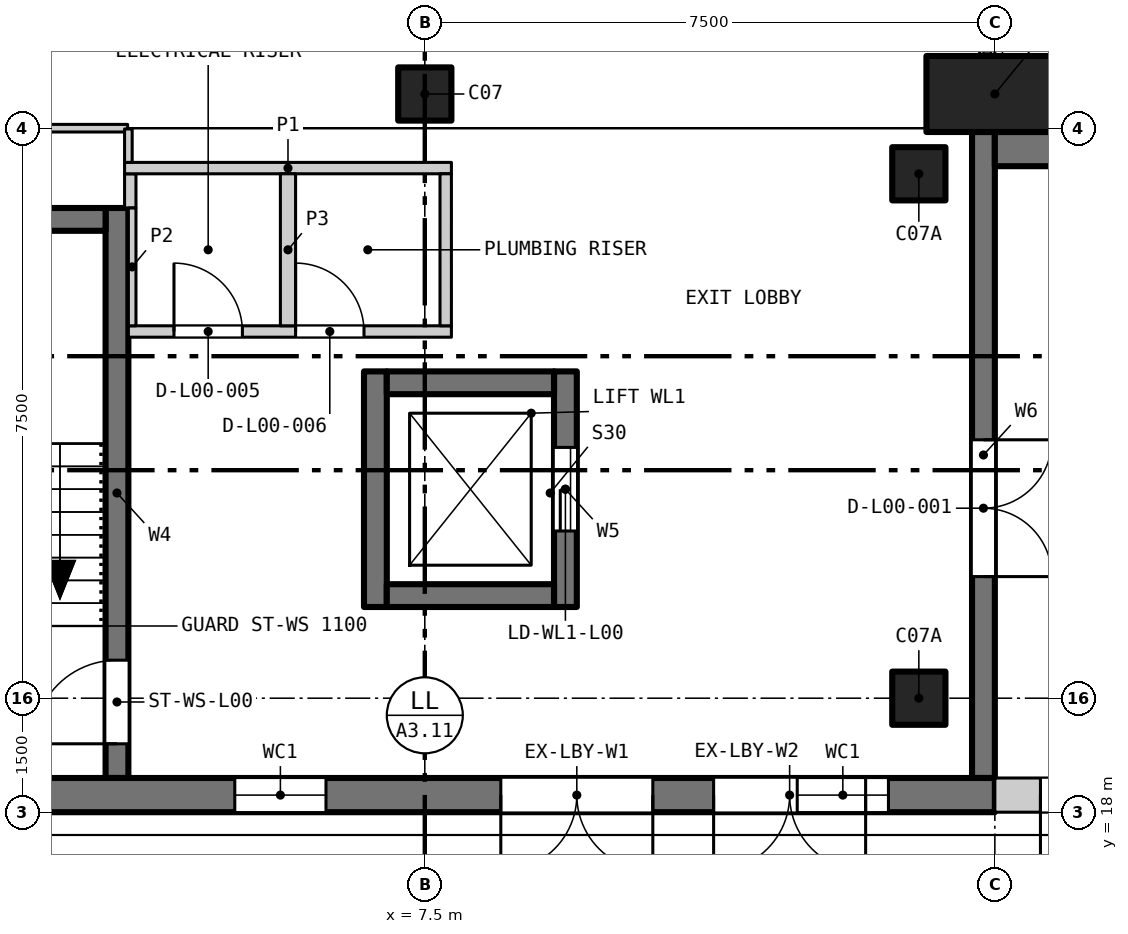
"""IFC4 building model, lengths in metres.
Left out: names, types, materials, properties, quantities, classifications, styles, units other than length and angle.
Written with IfcOpenShell. Run it as: python <this file> out.ifc"""

import sys

from ifc_helpers import new_model, si_unit, direction, frame, frame_2d, origin, origin_2d, place, context, subcontext, project, spatial, rectangle, extrude, element, fill, save


model = new_model("IFC4")
c1 = context("Model", 3, precision=1e-05, world=origin(), true_north=direction((0.0, 1.0)))
c2 = subcontext(c1, "Body", "Model", "MODEL_VIEW")
j1 = project(units=[si_unit("LENGTHUNIT", "METRE"), si_unit("PLANEANGLEUNIT", "RADIAN")], contexts=[c1])
p1 = place(None, origin())
s1 = spatial("IfcSite", under=j1, at=p1, CompositionType="ELEMENT")
p2 = place(p1, origin())
s2 = spatial("IfcBuilding", under=s1, at=p2, CompositionType="ELEMENT")
p3 = place(p2, origin())
s3 = spatial("IfcBuildingStorey", under=s2, at=p3, CompositionType="ELEMENT", Elevation=0.0)
for number, where, z_axis, x_axis in (
    (1, (7.5, 27.45, 0.0), (0.0, 0.0, 1.0), (1.0, 0.0, 0.0)),
    (2, (14.0, 19.5, 0.0), (0.0, 0.0, 1.0), (1.0, 0.0, 0.0)),
    (3, (14.0, 26.4, 0.0), (0.0, 0.0, 1.0), (1.0, 0.0, 0.0)),
):
    element("IfcColumn", number, at=place(p3, frame(where, z_axis=z_axis, x_axis=x_axis)), inside=s3, PredefinedType="COLUMN", context=c2, shape_type="SweptSolid", body=[
        extrude(rectangle(XDim=0.7, YDim=0.7, at=origin_2d()), origin(), (0.0, 0.0, 1.0), 6.0),
    ])
p4 = place(p3, frame((14.85, 18.45, 0.0), z_axis=(0.0, 0.0, 1.0), x_axis=(0.0, 1.0, 0.0)))
e4 = element("IfcWall", 4, at=p4, inside=s3, PredefinedType="SOLIDWALL", context=c2, shape_type="SweptSolid", body=[
    extrude(rectangle(XDim=8.5, YDim=0.3, at=frame_2d((4.25, 0.0))), origin(), (0.0, 0.0, 1.0), 6.0),
])
p5 = place(p4, frame((2.65, 0.0, 0.0)))
e5 = element("IfcOpeningElement", 5, at=p5, cuts=e4, PredefinedType="OPENING", context=c2, shape_type="SweptSolid", body=[
    extrude(rectangle(XDim=1.8, YDim=2.1, at=frame_2d((0.9, 1.05))), frame((0.0, 0.16, 0.0), z_axis=(0.0, -1.0, 0.0), x_axis=(1.0, 0.0, 0.0)), (0.0, 0.0, 1.0), 0.32),
])
p6 = place(p3, frame((3.45, 18.45, 0.0), z_axis=(0.0, 0.0, 1.0), x_axis=(0.0, 1.0, 0.0)))
e6 = element("IfcWall", 6, at=p6, inside=s3, PredefinedType="SHEAR", context=c2, shape_type="SweptSolid", body=[
    extrude(rectangle(XDim=7.5, YDim=0.3, at=frame_2d((3.75, 0.0))), origin(), (0.0, 0.0, 1.0), 6.0),
])
p7 = place(p6, frame((0.45, 0.0, 0.0)))
e7 = element("IfcOpeningElement", 7, at=p7, cuts=e6, PredefinedType="OPENING", context=c2, shape_type="SweptSolid", body=[
    extrude(rectangle(XDim=1.1, YDim=2.1, at=frame_2d((0.55, 1.05))), frame((0.0, 0.16, 0.0), z_axis=(0.0, -1.0, 0.0), x_axis=(1.0, 0.0, 0.0)), (0.0, 0.0, 1.0), 0.32),
])
p8 = place(p3, frame((0.3, 25.8, 0.0), z_axis=(0.0, 0.0, 1.0), x_axis=(1.0, 0.0, 0.0)))
e8 = element("IfcWall", 8, at=p8, inside=s3, PredefinedType="SHEAR", context=c2, shape_type="SweptSolid", body=[
    extrude(rectangle(XDim=3.0, YDim=0.3, at=frame_2d((1.5, 0.0))), origin(), (0.0, 0.0, 1.0), 6.0),
])
p9 = place(p3, frame((6.85, 20.7, 0.0), z_axis=(0.0, 0.0, 1.0), x_axis=(0.0, 1.0, 0.0)))
e9 = element("IfcWall", 9, at=p9, inside=s3, PredefinedType="SHEAR", context=c2, shape_type="SweptSolid", body=[
    extrude(rectangle(XDim=3.1, YDim=0.3, at=frame_2d((1.55, 0.0))), origin(), (0.0, 0.0, 1.0), 6.0),
])
p10 = place(p3, frame((9.35, 20.7, 0.0), z_axis=(0.0, 0.0, 1.0), x_axis=(0.0, 1.0, 0.0)))
e10 = element("IfcWall", 10, at=p10, inside=s3, PredefinedType="SHEAR", context=c2, shape_type="SweptSolid", body=[
    extrude(rectangle(XDim=3.1, YDim=0.3, at=frame_2d((1.55, 0.0))), origin(), (0.0, 0.0, 1.0), 6.0),
])
p11 = place(p10, frame((1.0, 0.0, 0.0)))
e11 = element("IfcOpeningElement", 11, at=p11, cuts=e10, PredefinedType="OPENING", context=c2, shape_type="SweptSolid", body=[
    extrude(rectangle(XDim=1.1, YDim=2.1, at=frame_2d((0.55, 1.05))), frame((0.0, 0.16, 0.0), z_axis=(0.0, -1.0, 0.0), x_axis=(1.0, 0.0, 0.0)), (0.0, 0.0, 1.0), 0.32),
])
for number, where, z_axis, x_axis in (
    (12, (7.0, 20.85, 0.0), (0.0, 0.0, 1.0), (1.0, 0.0, 0.0)),
    (13, (7.0, 23.65, 0.0), (0.0, 0.0, 1.0), (1.0, 0.0, 0.0)),
):
    element("IfcWall", number, at=place(p3, frame(where, z_axis=z_axis, x_axis=x_axis)), inside=s3, PredefinedType="SHEAR", context=c2, shape_type="SweptSolid", body=[
        extrude(rectangle(XDim=2.2, YDim=0.3, at=frame_2d((1.1, 0.0))), origin(), (0.0, 0.0, 1.0), 6.0),
    ])
p12 = place(p3, frame((15.0, 27.45, 0.0), z_axis=(0.0, 0.0, 1.0), x_axis=(1.0, 0.0, 0.0)))
e14 = element("IfcColumn", 14, at=p12, inside=s3, PredefinedType="COLUMN", context=c2, shape_type="SweptSolid", body=[
    extrude(rectangle(XDim=1.8, YDim=1.0, at=origin_2d()), origin(), (0.0, 0.0, 1.0), 6.0),
])
p13 = place(p3, frame((15.0, 18.225, 0.0), z_axis=(0.0, 0.0, 1.0), x_axis=(-1.0, 0.0, 0.0)))
e15 = element("IfcWall", 15, at=p13, inside=s3, PredefinedType="SOLIDWALL", context=c2, shape_type="SweptSolid", body=[
    extrude(rectangle(XDim=14.7, YDim=0.45, at=frame_2d((7.35, 0.0))), origin(), (0.0, 0.0, 1.0), 5.75),
])
p14 = place(p13, frame((8.8, 0.0, 0.9)))
e16 = element("IfcOpeningElement", 16, at=p14, cuts=e15, PredefinedType="OPENING", context=c2, shape_type="SweptSolid", body=[
    extrude(rectangle(XDim=1.2, YDim=1.5, at=frame_2d((0.6, 0.75))), frame((0.0, 0.235, 0.0), z_axis=(0.0, -1.0, 0.0), x_axis=(1.0, 0.0, 0.0)), (0.0, 0.0, 1.0), 0.47),
])
p15 = place(p13, frame((1.4, 0.0, 0.9)))
e17 = element("IfcOpeningElement", 17, at=p15, cuts=e15, PredefinedType="OPENING", context=c2, shape_type="SweptSolid", body=[
    extrude(rectangle(XDim=1.2, YDim=1.5, at=frame_2d((0.6, 0.75))), frame((0.0, 0.235, 0.0), z_axis=(0.0, -1.0, 0.0), x_axis=(1.0, 0.0, 0.0)), (0.0, 0.0, 1.0), 0.47),
])
p16 = place(p13, frame((12.6, 0.0, 0.0)))
e18 = element("IfcOpeningElement", 18, at=p16, cuts=e15, PredefinedType="OPENING", context=c2, shape_type="SweptSolid", body=[
    extrude(rectangle(XDim=1.2, YDim=2.4, at=frame_2d((0.6, 1.2))), frame((0.0, 0.235, 0.0), z_axis=(0.0, -1.0, 0.0), x_axis=(1.0, 0.0, 0.0)), (0.0, 0.0, 1.0), 0.47),
])
p17 = place(p13, frame((4.5, 0.0, 0.0)))
e19 = element("IfcOpeningElement", 19, at=p17, cuts=e15, PredefinedType="OPENING", context=c2, shape_type="SweptSolid", body=[
    extrude(rectangle(XDim=2.0, YDim=2.4, at=frame_2d((1.0, 1.2))), frame((0.0, 0.235, 0.0), z_axis=(0.0, -1.0, 0.0), x_axis=(1.0, 0.0, 0.0)), (0.0, 0.0, 1.0), 0.47),
])
p18 = place(p13, frame((1.7, 0.0, 0.0)))
e20 = element("IfcOpeningElement", 20, at=p18, cuts=e15, PredefinedType="OPENING", context=c2, shape_type="SweptSolid", body=[
    extrude(rectangle(XDim=2.0, YDim=2.4, at=frame_2d((1.0, 1.2))), frame((0.0, 0.235, 0.0), z_axis=(0.0, -1.0, 0.0), x_axis=(1.0, 0.0, 0.0)), (0.0, 0.0, 1.0), 0.47),
])
p19 = place(p3, frame((43.0, 26.725, 0.0), z_axis=(0.0, 0.0, 1.0), x_axis=(-1.0, 0.0, 0.0)))
e21 = element("IfcWall", 21, at=p19, inside=s3, PredefinedType="SOLIDWALL", context=c2, shape_type="SweptSolid", body=[
    extrude(rectangle(XDim=28.0, YDim=0.45, at=frame_2d((14.0, 0.0))), origin(), (0.0, 0.0, 1.0), 5.7),
])
p20 = place(p19, frame((18.3, 0.0, 0.0)))
e22 = element("IfcOpeningElement", 22, at=p20, cuts=e21, PredefinedType="OPENING", context=c2, shape_type="SweptSolid", body=[
    extrude(rectangle(XDim=2.4, YDim=2.4, at=frame_2d((1.2, 1.2))), frame((0.0, 0.235, 0.0), z_axis=(0.0, -1.0, 0.0), x_axis=(1.0, 0.0, 0.0)), (0.0, 0.0, 1.0), 0.47),
])
p21 = place(p19, frame((6.3, 0.0, 0.0)))
e23 = element("IfcOpeningElement", 23, at=p21, cuts=e21, PredefinedType="OPENING", context=c2, shape_type="SweptSolid", body=[
    extrude(rectangle(XDim=2.4, YDim=2.4, at=frame_2d((1.2, 1.2))), frame((0.0, 0.235, 0.0), z_axis=(0.0, -1.0, 0.0), x_axis=(1.0, 0.0, 0.0)), (0.0, 0.0, 1.0), 0.47),
])
p22 = place(p3, frame((43.0, 18.225, 0.0), z_axis=(0.0, 0.0, 1.0), x_axis=(-1.0, 0.0, 0.0)))
e24 = element("IfcWall", 24, at=p22, inside=s3, PredefinedType="SOLIDWALL", context=c2, shape_type="SweptSolid", body=[
    extrude(rectangle(XDim=28.0, YDim=0.45, at=frame_2d((14.0, 0.0))), origin(), (0.0, 0.0, 1.0), 5.7),
])
p23 = place(p22, frame((21.5, 0.0, 0.0)))
e25 = element("IfcOpeningElement", 25, at=p23, cuts=e24, PredefinedType="OPENING", context=c2, shape_type="SweptSolid", body=[
    extrude(rectangle(XDim=3.0, YDim=4.2, at=frame_2d((1.5, 2.1))), frame((0.0, 0.235, 0.0), z_axis=(0.0, -1.0, 0.0), x_axis=(1.0, 0.0, 0.0)), (0.0, 0.0, 1.0), 0.47),
])
p24 = place(p22, frame((15.5, 0.0, 0.0)))
e26 = element("IfcOpeningElement", 26, at=p24, cuts=e24, PredefinedType="OPENING", context=c2, shape_type="SweptSolid", body=[
    extrude(rectangle(XDim=3.0, YDim=4.2, at=frame_2d((1.5, 2.1))), frame((0.0, 0.235, 0.0), z_axis=(0.0, -1.0, 0.0), x_axis=(1.0, 0.0, 0.0)), (0.0, 0.0, 1.0), 0.47),
])
p25 = place(p22, frame((9.5, 0.0, 0.0)))
e27 = element("IfcOpeningElement", 27, at=p25, cuts=e24, PredefinedType="OPENING", context=c2, shape_type="SweptSolid", body=[
    extrude(rectangle(XDim=3.0, YDim=4.2, at=frame_2d((1.5, 2.1))), frame((0.0, 0.235, 0.0), z_axis=(0.0, -1.0, 0.0), x_axis=(1.0, 0.0, 0.0)), (0.0, 0.0, 1.0), 0.47),
])
p26 = place(p22, frame((3.5, 0.0, 0.0)))
e28 = element("IfcOpeningElement", 28, at=p26, cuts=e24, PredefinedType="OPENING", context=c2, shape_type="SweptSolid", body=[
    extrude(rectangle(XDim=3.0, YDim=4.2, at=frame_2d((1.5, 2.1))), frame((0.0, 0.235, 0.0), z_axis=(0.0, -1.0, 0.0), x_axis=(1.0, 0.0, 0.0)), (0.0, 0.0, 1.0), 0.47),
])
p27 = place(p22, frame((25.6, 0.0, 0.0)))
e29 = element("IfcOpeningElement", 29, at=p27, cuts=e24, PredefinedType="OPENING", context=c2, shape_type="SweptSolid", body=[
    extrude(rectangle(XDim=1.8, YDim=2.4, at=frame_2d((0.9, 1.2))), frame((0.0, 0.235, 0.0), z_axis=(0.0, -1.0, 0.0), x_axis=(1.0, 0.0, 0.0)), (0.0, 0.0, 1.0), 0.47),
])
p28 = place(p22, frame((0.6, 0.0, 0.0)))
e30 = element("IfcOpeningElement", 30, at=p28, cuts=e24, PredefinedType="OPENING", context=c2, shape_type="SweptSolid", body=[
    extrude(rectangle(XDim=1.8, YDim=2.4, at=frame_2d((0.9, 1.2))), frame((0.0, 0.235, 0.0), z_axis=(0.0, -1.0, 0.0), x_axis=(1.0, 0.0, 0.0)), (0.0, 0.0, 1.0), 0.47),
])
p29 = place(p3, frame((3.625, 25.95, 0.0), z_axis=(0.0, 0.0, 1.0), x_axis=(0.0, 1.0, 0.0)))
e31 = element("IfcWall", 31, at=p29, inside=s3, PredefinedType="PARTITIONING", context=c2, shape_type="SweptSolid", body=[
    extrude(rectangle(XDim=0.45, YDim=0.15, at=frame_2d((0.225, 0.0))), origin(), (0.0, 0.0, 1.0), 5.75),
])
p30 = place(p3, frame((3.55, 26.475, 0.0), z_axis=(0.0, 0.0, 1.0), x_axis=(1.0, 0.0, 0.0)))
e32 = element("IfcWall", 32, at=p30, inside=s3, PredefinedType="PARTITIONING", context=c2, shape_type="SweptSolid", body=[
    extrude(rectangle(XDim=4.3, YDim=0.15, at=frame_2d((2.15, 0.0))), origin(), (0.0, 0.0, 1.0), 4.35),
])
p31 = place(p3, frame((3.6, 24.325, 0.0), z_axis=(0.0, 0.0, 1.0), x_axis=(1.0, 0.0, 0.0)))
e33 = element("IfcWall", 33, at=p31, inside=s3, PredefinedType="PARTITIONING", context=c2, shape_type="SweptSolid", body=[
    extrude(rectangle(XDim=4.25, YDim=0.15, at=frame_2d((2.125, 0.0))), origin(), (0.0, 0.0, 1.0), 5.75),
])
p32 = place(p31, frame((0.6, 0.0, 0.0)))
e34 = element("IfcOpeningElement", 34, at=p32, cuts=e33, PredefinedType="OPENING", context=c2, shape_type="SweptSolid", body=[
    extrude(rectangle(XDim=0.9, YDim=2.1, at=frame_2d((0.45, 1.05))), frame((0.0, 0.085, 0.0), z_axis=(0.0, -1.0, 0.0), x_axis=(1.0, 0.0, 0.0)), (0.0, 0.0, 1.0), 0.17),
])
p33 = place(p31, frame((2.2, 0.0, 0.0)))
e35 = element("IfcOpeningElement", 35, at=p33, cuts=e33, PredefinedType="OPENING", context=c2, shape_type="SweptSolid", body=[
    extrude(rectangle(XDim=0.9, YDim=2.1, at=frame_2d((0.45, 1.05))), frame((0.0, 0.085, 0.0), z_axis=(0.0, -1.0, 0.0), x_axis=(1.0, 0.0, 0.0)), (0.0, 0.0, 1.0), 0.17),
])
p34 = place(p3, frame((3.65, 24.4, 0.0), z_axis=(0.0, 0.0, 1.0), x_axis=(0.0, 1.0, 0.0)))
e36 = element("IfcWall", 36, at=p34, inside=s3, PredefinedType="PARTITIONING", context=c2, shape_type="SweptSolid", body=[
    extrude(rectangle(XDim=1.55, YDim=0.1, at=frame_2d((0.775, 0.0))), origin(), (0.0, 0.0, 1.0), 5.75),
])
p35 = place(p3, frame((5.7, 24.4, 0.0), z_axis=(0.0, 0.0, 1.0), x_axis=(0.0, 1.0, 0.0)))
e37 = element("IfcWall", 37, at=p35, inside=s3, PredefinedType="PARTITIONING", context=c2, shape_type="SweptSolid", body=[
    extrude(rectangle(XDim=2.0, YDim=0.2, at=frame_2d((1.0, 0.0))), origin(), (0.0, 0.0, 1.0), 5.75),
])
p36 = place(p3, frame((7.775, 24.4, 0.0), z_axis=(0.0, 0.0, 1.0), x_axis=(0.0, 1.0, 0.0)))
e38 = element("IfcWall", 38, at=p36, inside=s3, PredefinedType="PARTITIONING", context=c2, shape_type="SweptSolid", body=[
    extrude(rectangle(XDim=2.0, YDim=0.15, at=frame_2d((1.0, 0.0))), origin(), (0.0, 0.0, 1.0), 5.75),
])
p37 = place(p3, frame((0.3, 27.0, 0.0), z_axis=(0.0, 0.0, 1.0), x_axis=(1.0, 0.0, 0.0)))
e39 = element("IfcWall", 39, at=p37, inside=s3, PredefinedType="PARTITIONING", context=c2, shape_type="SweptSolid", body=[
    extrude(rectangle(XDim=3.29, YDim=0.1, at=frame_2d((1.645, 0.0))), origin(), (0.0, 0.0, 1.0), 5.8),
])
p38 = place(p3, frame((3.6, 26.55, 0.0), z_axis=(0.0, 0.0, 1.0), x_axis=(0.0, 1.0, 0.0)))
e40 = element("IfcWall", 40, at=p38, inside=s3, PredefinedType="PARTITIONING", context=c2, shape_type="SweptSolid", body=[
    extrude(rectangle(XDim=0.44, YDim=0.1, at=frame_2d((0.22, 0.0))), origin(), (0.0, 0.0, 1.0), 5.75),
])
p39 = place(p14, origin())
e41 = element("IfcWindow", 41, at=p39, inside=s3, PartitioningType="SINGLE_PANEL", PredefinedType="WINDOW", context=c2, shape_type="SweptSolid", body=[
    extrude(rectangle(XDim=1.2, YDim=1.5, at=frame_2d((0.6, 0.75))), frame((0.0, -0.075, 0.0), z_axis=(0.0, -1.0, 0.0), x_axis=(1.0, 0.0, 0.0)), (0.0, 0.0, 1.0), 0.06),
])
fill(e16, e41)
p40 = place(p15, origin())
e42 = element("IfcWindow", 42, at=p40, inside=s3, PartitioningType="SINGLE_PANEL", PredefinedType="WINDOW", context=c2, shape_type="SweptSolid", body=[
    extrude(rectangle(XDim=1.2, YDim=1.5, at=frame_2d((0.6, 0.75))), frame((0.0, -0.075, 0.0), z_axis=(0.0, -1.0, 0.0), x_axis=(1.0, 0.0, 0.0)), (0.0, 0.0, 1.0), 0.06),
])
fill(e17, e42)
p41 = place(p27, origin())
e43 = element("IfcDoor", 43, at=p41, inside=s3, OperationType="DOUBLE_DOOR_DOUBLE_SWING", PredefinedType="DOOR", context=c2, shape_type="SweptSolid", body=[
    extrude(rectangle(XDim=1.8, YDim=2.4, at=frame_2d((0.9, 1.2))), frame((0.0, 0.025, 0.0), z_axis=(0.0, -1.0, 0.0), x_axis=(1.0, 0.0, 0.0)), (0.0, 0.0, 1.0), 0.05),
])
fill(e29, e43)
p42 = place(p17, origin())
e44 = element("IfcDoor", 44, at=p42, inside=s3, OperationType="DOUBLE_DOOR_DOUBLE_SWING", PredefinedType="DOOR", context=c2, shape_type="SweptSolid", body=[
    extrude(rectangle(XDim=2.0, YDim=2.4, at=frame_2d((1.0, 1.2))), frame((0.0, 0.025, 0.0), z_axis=(0.0, -1.0, 0.0), x_axis=(1.0, 0.0, 0.0)), (0.0, 0.0, 1.0), 0.05),
])
fill(e19, e44)
p43 = place(p18, origin())
e45 = element("IfcDoor", 45, at=p43, inside=s3, OperationType="DOUBLE_DOOR_DOUBLE_SWING", PredefinedType="DOOR", context=c2, shape_type="SweptSolid", body=[
    extrude(rectangle(XDim=2.0, YDim=2.4, at=frame_2d((1.0, 1.2))), frame((0.0, 0.025, 0.0), z_axis=(0.0, -1.0, 0.0), x_axis=(1.0, 0.0, 0.0)), (0.0, 0.0, 1.0), 0.05),
])
fill(e20, e45)
p44 = place(p5, frame((1.8, 0.0, 0.0), z_axis=(0.0, 0.0, 1.0), x_axis=(-1.0, 0.0, 0.0)))
e46 = element("IfcDoor", 46, at=p44, inside=s3, OperationType="DOUBLE_DOOR_SINGLE_SWING", PredefinedType="DOOR", context=c2, shape_type="SweptSolid", body=[
    extrude(rectangle(XDim=1.8, YDim=2.1, at=frame_2d((0.9, 1.05))), frame((0.0, 0.025, 0.0), z_axis=(0.0, -1.0, 0.0), x_axis=(1.0, 0.0, 0.0)), (0.0, 0.0, 1.0), 0.05),
])
fill(e5, e46)
p45 = place(p32, origin())
e47 = element("IfcDoor", 47, at=p45, inside=s3, OperationType="SINGLE_SWING_LEFT", PredefinedType="DOOR", context=c2, shape_type="SweptSolid", body=[
    extrude(rectangle(XDim=0.9, YDim=2.1, at=frame_2d((0.45, 1.05))), frame((0.0, 0.025, 0.0), z_axis=(0.0, -1.0, 0.0), x_axis=(1.0, 0.0, 0.0)), (0.0, 0.0, 1.0), 0.05),
])
fill(e34, e47)
p46 = place(p33, origin())
e48 = element("IfcDoor", 48, at=p46, inside=s3, OperationType="SINGLE_SWING_LEFT", PredefinedType="DOOR", context=c2, shape_type="SweptSolid", body=[
    extrude(rectangle(XDim=0.9, YDim=2.1, at=frame_2d((0.45, 1.05))), frame((0.0, 0.025, 0.0), z_axis=(0.0, -1.0, 0.0), x_axis=(1.0, 0.0, 0.0)), (0.0, 0.0, 1.0), 0.05),
])
fill(e35, e48)
p47 = place(p7, origin())
e49 = element("IfcDoor", 49, at=p47, inside=s3, OperationType="SINGLE_SWING_LEFT", PredefinedType="DOOR", context=c2, shape_type="SweptSolid", body=[
    extrude(rectangle(XDim=1.1, YDim=2.1, at=frame_2d((0.55, 1.05))), frame((0.0, 0.025, 0.0), z_axis=(0.0, -1.0, 0.0), x_axis=(1.0, 0.0, 0.0)), (0.0, 0.0, 1.0), 0.05),
])
fill(e7, e49)
p48 = place(p11, origin())
e50 = element("IfcDoor", 50, at=p48, inside=s3, OperationType="SLIDING_TO_LEFT", PredefinedType="DOOR", context=c2, shape_type="SweptSolid", body=[
    extrude(rectangle(XDim=1.1, YDim=2.1, at=frame_2d((0.55, 1.05))), frame((0.0, 0.025, 0.0), z_axis=(0.0, -1.0, 0.0), x_axis=(1.0, 0.0, 0.0)), (0.0, 0.0, 1.0), 0.05),
])
fill(e11, e50)
save(model, sys.argv[1])
